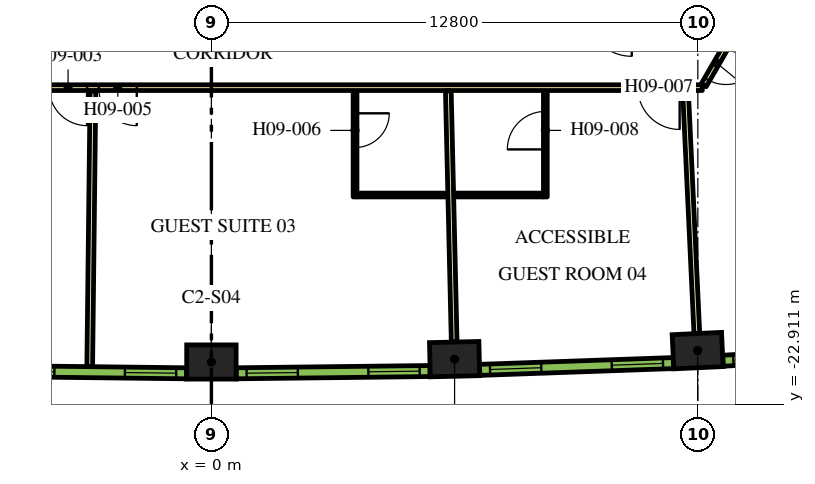
"""IFC4 building model, lengths in metres.
Left out: names, types, materials, properties, quantities, classifications, styles, units other than length and angle.
Written with IfcOpenShell. Run it as: python <this file> out.ifc"""

import sys

from ifc_helpers import new_model, si_unit, direction, frame, frame_2d, origin, origin_2d, place, context, subcontext, project, spatial, rectangle, extrude, element, fill, save


model = new_model("IFC4")
c1 = context("Model", 3, precision=1e-05, world=origin(), true_north=direction((0.0, 1.0)))
c2 = subcontext(c1, "Body", "Model", "MODEL_VIEW")
j1 = project(units=[si_unit("LENGTHUNIT", "METRE"), si_unit("PLANEANGLEUNIT", "RADIAN")], contexts=[c1])
p1 = place(None, origin())
s1 = spatial("IfcSite", under=j1, at=p1, CompositionType="ELEMENT")
p2 = place(p1, origin())
s2 = spatial("IfcBuilding", under=s1, at=p2, CompositionType="ELEMENT")
p3 = place(p2, frame((0.0, 0.0, 126.6)))
s3 = spatial("IfcBuildingStorey", under=s2, at=p3, CompositionType="ELEMENT", Elevation=126.6)
for number, where, z_axis, x_axis in (
    (1, (0.0, -21.794, 0.0), (0.0, 0.0, 1.0), (1.0, 0.0, 0.0)),
    (2, (6.399, -21.719, 0.0), (0.0, 0.0, 1.0), (1.0, 0.023, 0.0)),
    (3, (12.795, -21.494, 0.0), (0.0, 0.0, 1.0), (0.999, 0.047, 0.0)),
):
    element("IfcColumn", number, at=place(p3, frame(where, z_axis=z_axis, x_axis=x_axis)), inside=s3, PredefinedType="COLUMN", context=c2, shape_type="SweptSolid", body=[
        extrude(rectangle(XDim=1.3, YDim=0.9, at=origin_2d()), origin(), (0.0, 0.0, 1.0), 3.9),
    ])
p4 = place(p3, frame((12.918, -14.575, 0.0), z_axis=(0.0, 0.0, 1.0), x_axis=(-1.0, 0.0, 0.0)))
e4 = element("IfcWall", 4, at=p4, inside=s3, PredefinedType="PARTITIONING", context=c2, shape_type="SweptSolid", body=[
    extrude(rectangle(XDim=25.766, YDim=0.15, at=frame_2d((12.883, 0.0))), origin(), (0.0, 0.0, 1.0), 2.75),
])
p5 = place(p4, frame((16.189, 0.0, 0.0)))
e5 = element("IfcOpeningElement", 5, at=p5, cuts=e4, PredefinedType="OPENING", context=c2, shape_type="SweptSolid", body=[
    extrude(rectangle(XDim=1.0, YDim=2.1, at=frame_2d((0.5, 1.05))), frame((0.0, 0.085, 0.0), z_axis=(0.0, -1.0, 0.0), x_axis=(1.0, 0.0, 0.0)), (0.0, 0.0, 1.0), 0.17),
])
p6 = place(p4, frame((14.882, 0.0, 0.0)))
e6 = element("IfcOpeningElement", 6, at=p6, cuts=e4, PredefinedType="OPENING", context=c2, shape_type="SweptSolid", body=[
    extrude(rectangle(XDim=1.0, YDim=2.1, at=frame_2d((0.5, 1.05))), frame((0.0, 0.085, 0.0), z_axis=(0.0, -1.0, 0.0), x_axis=(1.0, 0.0, 0.0)), (0.0, 0.0, 1.0), 0.17),
])
p7 = place(p4, frame((0.596, 0.0, 0.0)))
e7 = element("IfcOpeningElement", 7, at=p7, cuts=e4, PredefinedType="OPENING", context=c2, shape_type="SweptSolid", body=[
    extrude(rectangle(XDim=1.1, YDim=2.1, at=frame_2d((0.55, 1.05))), frame((0.0, 0.085, 0.0), z_axis=(0.0, -1.0, 0.0), x_axis=(1.0, 0.0, 0.0)), (0.0, 0.0, 1.0), 0.17),
])
p8 = place(p3, frame((15.587, -9.952, 0.0), z_axis=(0.0, 0.0, 1.0), x_axis=(-0.500016618951, -0.866015808616, 0.0)))
e8 = element("IfcWall", 8, at=p8, inside=s3, PredefinedType="PARTITIONING", context=c2, shape_type="SweptSolid", body=[
    extrude(rectangle(XDim=5.268, YDim=0.15, at=frame_2d((2.634, 0.0))), origin(), (0.0, 0.0, 1.0), 2.75),
])
p9 = place(p8, frame((4.088, 0.0, 0.0)))
e9 = element("IfcOpeningElement", 9, at=p9, cuts=e8, PredefinedType="OPENING", context=c2, shape_type="SweptSolid", body=[
    extrude(rectangle(XDim=1.0, YDim=2.1, at=frame_2d((0.5, 1.05))), frame((0.0, 0.085, 0.0), z_axis=(0.0, -1.0, 0.0), x_axis=(1.0, 0.0, 0.0)), (0.0, 0.0, 1.0), 0.17),
])
p10 = place(p3, frame((-3.202, -21.916, 0.0), z_axis=(0.0, 0.0, 1.0), x_axis=(0.011707696285, 0.999931462575, 0.0)))
e10 = element("IfcWall", 10, at=p10, inside=s3, PredefinedType="PARTITIONING", context=c2, shape_type="SweptSolid", body=[
    extrude(rectangle(XDim=7.257, YDim=0.15, at=frame_2d((3.628, 0.0))), origin(), (0.0, 0.0, 1.0), 2.75),
])
p11 = place(p3, frame((6.389, -21.269, 0.0), z_axis=(0.0, 0.0, 1.0), x_axis=(-0.023377429176, 0.999726710559, 0.0)))
e11 = element("IfcWall", 11, at=p11, inside=s3, PredefinedType="PARTITIONING", context=c2, shape_type="SweptSolid", body=[
    extrude(rectangle(XDim=6.611, YDim=0.15, at=frame_2d((3.305, 0.0))), origin(), (0.0, 0.0, 1.0), 2.75),
])
p12 = place(p3, frame((12.774, -21.045, 0.0), z_axis=(0.0, 0.0, 1.0), x_axis=(-0.046750341626, 0.998906605023, 0.0)))
e12 = element("IfcWall", 12, at=p12, inside=s3, PredefinedType="PARTITIONING", context=c2, shape_type="SweptSolid", body=[
    extrude(rectangle(XDim=6.392, YDim=0.15, at=frame_2d((3.196, 0.0))), origin(), (0.0, 0.0, 1.0), 2.75),
])
p13 = place(p3, frame((3.78, -14.65, 0.0), z_axis=(0.0, 0.0, 1.0), x_axis=(0.0, -1.0, 0.0)))
e13 = element("IfcWall", 13, at=p13, inside=s3, PredefinedType="PARTITIONING", context=c2, shape_type="SweptSolid", body=[
    extrude(rectangle(XDim=2.8, YDim=0.1, at=frame_2d((1.4, 0.0))), origin(), (0.0, 0.0, 1.0), 2.75),
])
p14 = place(p13, frame((0.6, 0.0, 0.0)))
e14 = element("IfcOpeningElement", 14, at=p14, cuts=e13, PredefinedType="OPENING", context=c2, shape_type="SweptSolid", body=[
    extrude(rectangle(XDim=0.9, YDim=2.1, at=frame_2d((0.45, 1.05))), frame((0.0, 0.06, 0.0), z_axis=(0.0, -1.0, 0.0), x_axis=(1.0, 0.0, 0.0)), (0.0, 0.0, 1.0), 0.12),
])
p15 = place(p3, frame((3.83, -17.4, 0.0), z_axis=(0.0, 0.0, 1.0), x_axis=(1.0, 0.0, 0.0)))
e15 = element("IfcWall", 15, at=p15, inside=s3, PredefinedType="PARTITIONING", context=c2, shape_type="SweptSolid", body=[
    extrude(rectangle(XDim=2.39, YDim=0.1, at=frame_2d((1.195, 0.0))), origin(), (0.0, 0.0, 1.0), 2.75),
])
p16 = place(p3, frame((8.788, -17.45, 0.0), z_axis=(0.0, 0.0, 1.0), x_axis=(0.0, 1.0, 0.0)))
e16 = element("IfcWall", 16, at=p16, inside=s3, PredefinedType="PARTITIONING", context=c2, shape_type="SweptSolid", body=[
    extrude(rectangle(XDim=2.8, YDim=0.1, at=frame_2d((1.4, 0.0))), origin(), (0.0, 0.0, 1.0), 2.75),
])
p17 = place(p16, frame((1.25, 0.0, 0.0)))
e17 = element("IfcOpeningElement", 17, at=p17, cuts=e16, PredefinedType="OPENING", context=c2, shape_type="SweptSolid", body=[
    extrude(rectangle(XDim=1.0, YDim=2.1, at=frame_2d((0.5, 1.05))), frame((0.0, 0.06, 0.0), z_axis=(0.0, -1.0, 0.0), x_axis=(1.0, 0.0, 0.0)), (0.0, 0.0, 1.0), 0.12),
])
p18 = place(p3, frame((8.738, -17.4, 0.0), z_axis=(0.0, 0.0, 1.0), x_axis=(-1.0, 0.0, 0.0)))
e18 = element("IfcWall", 18, at=p18, inside=s3, PredefinedType="PARTITIONING", context=c2, shape_type="SweptSolid", body=[
    extrude(rectangle(XDim=2.36, YDim=0.1, at=frame_2d((1.18, 0.0))), origin(), (0.0, 0.0, 1.0), 2.75),
])
p19 = place(p3, frame((-5.753, -22.031, 0.0), z_axis=(0.0, 0.0, 1.0), x_axis=(0.999931786565, -0.011679992145, 0.0)))
e19 = element("IfcWall", 19, at=p19, inside=s3, PredefinedType="SOLIDWALL", context=c2, shape_type="SweptSolid", body=[
    extrude(rectangle(XDim=5.1, YDim=0.29, at=frame_2d((2.55, 0.0))), origin(), (0.0, 0.0, 1.0), 3.65),
])
p20 = place(p19, frame((0.272, 0.0, 0.9)))
e20 = element("IfcOpeningElement", 20, at=p20, cuts=e19, PredefinedType="OPENING", context=c2, shape_type="SweptSolid", body=[
    extrude(rectangle(XDim=1.35, YDim=2.15, at=frame_2d((0.675, 1.075))), frame((0.0, 0.155, 0.0), z_axis=(0.0, -1.0, 0.0), x_axis=(1.0, 0.0, 0.0)), (0.0, 0.0, 1.0), 0.31),
])
p21 = place(p19, frame((3.478, 0.0, 0.9)))
e21 = element("IfcOpeningElement", 21, at=p21, cuts=e19, PredefinedType="OPENING", context=c2, shape_type="SweptSolid", body=[
    extrude(rectangle(XDim=1.35, YDim=2.15, at=frame_2d((0.675, 1.075))), frame((0.0, 0.155, 0.0), z_axis=(0.0, -1.0, 0.0), x_axis=(1.0, 0.0, 0.0)), (0.0, 0.0, 1.0), 0.31),
])
p22 = place(p3, frame((0.653, -22.091, 0.0), z_axis=(0.0, 0.0, 1.0), x_axis=(0.999931786565, 0.011679992145, 0.0)))
e22 = element("IfcWall", 22, at=p22, inside=s3, PredefinedType="SOLIDWALL", context=c2, shape_type="SweptSolid", body=[
    extrude(rectangle(XDim=5.1, YDim=0.29, at=frame_2d((2.55, 0.0))), origin(), (0.0, 0.0, 1.0), 3.65),
])
p23 = place(p22, frame((0.273, 0.0, 0.9)))
e23 = element("IfcOpeningElement", 23, at=p23, cuts=e22, PredefinedType="OPENING", context=c2, shape_type="SweptSolid", body=[
    extrude(rectangle(XDim=1.35, YDim=2.15, at=frame_2d((0.675, 1.075))), frame((0.0, 0.155, 0.0), z_axis=(0.0, -1.0, 0.0), x_axis=(1.0, 0.0, 0.0)), (0.0, 0.0, 1.0), 0.31),
])
p24 = place(p22, frame((3.478, 0.0, 0.9)))
e24 = element("IfcOpeningElement", 24, at=p24, cuts=e22, PredefinedType="OPENING", context=c2, shape_type="SweptSolid", body=[
    extrude(rectangle(XDim=1.35, YDim=2.15, at=frame_2d((0.675, 1.075))), frame((0.0, 0.155, 0.0), z_axis=(0.0, -1.0, 0.0), x_axis=(1.0, 0.0, 0.0)), (0.0, 0.0, 1.0), 0.31),
])
p25 = place(p3, frame((7.059, -22.001, 0.0), z_axis=(0.0, 0.0, 1.0), x_axis=(0.999385993957, 0.035037623812, 0.0)))
e25 = element("IfcWall", 25, at=p25, inside=s3, PredefinedType="SOLIDWALL", context=c2, shape_type="SweptSolid", body=[
    extrude(rectangle(XDim=5.101, YDim=0.29, at=frame_2d((2.55, 0.0))), origin(), (0.0, 0.0, 1.0), 3.65),
])
p26 = place(p25, frame((0.273, 0.0, 0.9)))
e26 = element("IfcOpeningElement", 26, at=p26, cuts=e25, PredefinedType="OPENING", context=c2, shape_type="SweptSolid", body=[
    extrude(rectangle(XDim=1.35, YDim=2.15, at=frame_2d((0.675, 1.075))), frame((0.0, 0.155, 0.0), z_axis=(0.0, -1.0, 0.0), x_axis=(1.0, 0.0, 0.0)), (0.0, 0.0, 1.0), 0.31),
])
p27 = place(p25, frame((3.478, 0.0, 0.9)))
e27 = element("IfcOpeningElement", 27, at=p27, cuts=e25, PredefinedType="OPENING", context=c2, shape_type="SweptSolid", body=[
    extrude(rectangle(XDim=1.35, YDim=2.15, at=frame_2d((0.675, 1.075))), frame((0.0, 0.155, 0.0), z_axis=(0.0, -1.0, 0.0), x_axis=(1.0, 0.0, 0.0)), (0.0, 0.0, 1.0), 0.31),
])
p28 = place(p3, frame((13.462, -21.761, 0.0), z_axis=(0.0, 0.0, 1.0), x_axis=(0.998290511436, 0.058447025388, 0.0)))
e28 = element("IfcWall", 28, at=p28, inside=s3, PredefinedType="SOLIDWALL", context=c2, shape_type="SweptSolid", body=[
    extrude(rectangle(XDim=5.1, YDim=0.29, at=frame_2d((2.55, 0.0))), origin(), (0.0, 0.0, 1.0), 3.65),
])
p29 = place(p28, frame((0.272, 0.0, 0.9)))
e29 = element("IfcOpeningElement", 29, at=p29, cuts=e28, PredefinedType="OPENING", context=c2, shape_type="SweptSolid", body=[
    extrude(rectangle(XDim=1.35, YDim=2.15, at=frame_2d((0.675, 1.075))), frame((0.0, 0.155, 0.0), z_axis=(0.0, -1.0, 0.0), x_axis=(1.0, 0.0, 0.0)), (0.0, 0.0, 1.0), 0.31),
])
p30 = place(p28, frame((3.478, 0.0, 0.9)))
e30 = element("IfcOpeningElement", 30, at=p30, cuts=e28, PredefinedType="OPENING", context=c2, shape_type="SweptSolid", body=[
    extrude(rectangle(XDim=1.35, YDim=2.15, at=frame_2d((0.675, 1.075))), frame((0.0, 0.155, 0.0), z_axis=(0.0, -1.0, 0.0), x_axis=(1.0, 0.0, 0.0)), (0.0, 0.0, 1.0), 0.31),
])
p31 = place(p5, origin())
e31 = element("IfcDoor", 31, at=p31, inside=s3, OperationType="SINGLE_SWING_LEFT", PredefinedType="DOOR", context=c2, shape_type="SweptSolid", body=[
    extrude(rectangle(XDim=1.0, YDim=2.1, at=frame_2d((0.5, 1.05))), frame((0.0, 0.025, 0.0), z_axis=(0.0, -1.0, 0.0), x_axis=(1.0, 0.0, 0.0)), (0.0, 0.0, 1.0), 0.05),
])
fill(e5, e31)
p32 = place(p6, origin())
e32 = element("IfcDoor", 32, at=p32, inside=s3, OperationType="SINGLE_SWING_RIGHT", PredefinedType="DOOR", context=c2, shape_type="SweptSolid", body=[
    extrude(rectangle(XDim=1.0, YDim=2.1, at=frame_2d((0.5, 1.05))), frame((0.0, 0.025, 0.0), z_axis=(0.0, -1.0, 0.0), x_axis=(1.0, 0.0, 0.0)), (0.0, 0.0, 1.0), 0.05),
])
fill(e6, e32)
p33 = place(p14, origin())
e33 = element("IfcDoor", 33, at=p33, inside=s3, OperationType="SINGLE_SWING_RIGHT", PredefinedType="DOOR", context=c2, shape_type="SweptSolid", body=[
    extrude(rectangle(XDim=0.9, YDim=2.1, at=frame_2d((0.45, 1.05))), frame((0.0, 0.025, 0.0), z_axis=(0.0, -1.0, 0.0), x_axis=(1.0, 0.0, 0.0)), (0.0, 0.0, 1.0), 0.05),
])
fill(e14, e33)
p34 = place(p7, origin())
e34 = element("IfcDoor", 34, at=p34, inside=s3, OperationType="SINGLE_SWING_LEFT", PredefinedType="DOOR", context=c2, shape_type="SweptSolid", body=[
    extrude(rectangle(XDim=1.1, YDim=2.1, at=frame_2d((0.55, 1.05))), frame((0.0, 0.025, 0.0), z_axis=(0.0, -1.0, 0.0), x_axis=(1.0, 0.0, 0.0)), (0.0, 0.0, 1.0), 0.05),
])
fill(e7, e34)
p35 = place(p17, origin())
e35 = element("IfcDoor", 35, at=p35, inside=s3, OperationType="SINGLE_SWING_LEFT", PredefinedType="DOOR", context=c2, shape_type="SweptSolid", body=[
    extrude(rectangle(XDim=1.0, YDim=2.1, at=frame_2d((0.5, 1.05))), frame((0.0, 0.025, 0.0), z_axis=(0.0, -1.0, 0.0), x_axis=(1.0, 0.0, 0.0)), (0.0, 0.0, 1.0), 0.05),
])
fill(e17, e35)
p36 = place(p9, origin())
e36 = element("IfcDoor", 36, at=p36, inside=s3, OperationType="SINGLE_SWING_RIGHT", PredefinedType="DOOR", context=c2, shape_type="SweptSolid", body=[
    extrude(rectangle(XDim=1.0, YDim=2.1, at=frame_2d((0.5, 1.05))), frame((0.0, 0.025, 0.0), z_axis=(0.0, -1.0, 0.0), x_axis=(1.0, 0.0, 0.0)), (0.0, 0.0, 1.0), 0.05),
])
fill(e9, e36)
p37 = place(p20, origin())
e37 = element("IfcWindow", 37, at=p37, inside=s3, PartitioningType="DOUBLE_PANEL_VERTICAL", PredefinedType="WINDOW", context=c2, shape_type="SweptSolid", body=[
    extrude(rectangle(XDim=1.35, YDim=2.15, at=frame_2d((0.675, 1.075))), frame((0.0, 0.015, 0.0), z_axis=(0.0, -1.0, 0.0), x_axis=(1.0, 0.0, 0.0)), (0.0, 0.0, 1.0), 0.06),
])
fill(e20, e37)
p38 = place(p21, origin())
e38 = element("IfcWindow", 38, at=p38, inside=s3, PartitioningType="DOUBLE_PANEL_VERTICAL", PredefinedType="WINDOW", context=c2, shape_type="SweptSolid", body=[
    extrude(rectangle(XDim=1.35, YDim=2.15, at=frame_2d((0.675, 1.075))), frame((0.0, 0.015, 0.0), z_axis=(0.0, -1.0, 0.0), x_axis=(1.0, 0.0, 0.0)), (0.0, 0.0, 1.0), 0.06),
])
fill(e21, e38)
p39 = place(p23, origin())
e39 = element("IfcWindow", 39, at=p39, inside=s3, PartitioningType="DOUBLE_PANEL_VERTICAL", PredefinedType="WINDOW", context=c2, shape_type="SweptSolid", body=[
    extrude(rectangle(XDim=1.35, YDim=2.15, at=frame_2d((0.675, 1.075))), frame((0.0, 0.015, 0.0), z_axis=(0.0, -1.0, 0.0), x_axis=(1.0, 0.0, 0.0)), (0.0, 0.0, 1.0), 0.06),
])
fill(e23, e39)
p40 = place(p24, origin())
e40 = element("IfcWindow", 40, at=p40, inside=s3, PartitioningType="DOUBLE_PANEL_VERTICAL", PredefinedType="WINDOW", context=c2, shape_type="SweptSolid", body=[
    extrude(rectangle(XDim=1.35, YDim=2.15, at=frame_2d((0.675, 1.075))), frame((0.0, 0.015, 0.0), z_axis=(0.0, -1.0, 0.0), x_axis=(1.0, 0.0, 0.0)), (0.0, 0.0, 1.0), 0.06),
])
fill(e24, e40)
p41 = place(p26, origin())
e41 = element("IfcWindow", 41, at=p41, inside=s3, PartitioningType="DOUBLE_PANEL_VERTICAL", PredefinedType="WINDOW", context=c2, shape_type="SweptSolid", body=[
    extrude(rectangle(XDim=1.35, YDim=2.15, at=frame_2d((0.675, 1.075))), frame((0.0, 0.015, 0.0), z_axis=(0.0, -1.0, 0.0), x_axis=(1.0, 0.0, 0.0)), (0.0, 0.0, 1.0), 0.06),
])
fill(e26, e41)
p42 = place(p27, origin())
e42 = element("IfcWindow", 42, at=p42, inside=s3, PartitioningType="DOUBLE_PANEL_VERTICAL", PredefinedType="WINDOW", context=c2, shape_type="SweptSolid", body=[
    extrude(rectangle(XDim=1.35, YDim=2.15, at=frame_2d((0.675, 1.075))), frame((0.0, 0.015, 0.0), z_axis=(0.0, -1.0, 0.0), x_axis=(1.0, 0.0, 0.0)), (0.0, 0.0, 1.0), 0.06),
])
fill(e27, e42)
p43 = place(p29, origin())
e43 = element("IfcWindow", 43, at=p43, inside=s3, PartitioningType="DOUBLE_PANEL_VERTICAL", PredefinedType="WINDOW", context=c2, shape_type="SweptSolid", body=[
    extrude(rectangle(XDim=1.35, YDim=2.15, at=frame_2d((0.675, 1.075))), frame((0.0, 0.015, 0.0), z_axis=(0.0, -1.0, 0.0), x_axis=(1.0, 0.0, 0.0)), (0.0, 0.0, 1.0), 0.06),
])
fill(e29, e43)
save(model, sys.argv[1])
